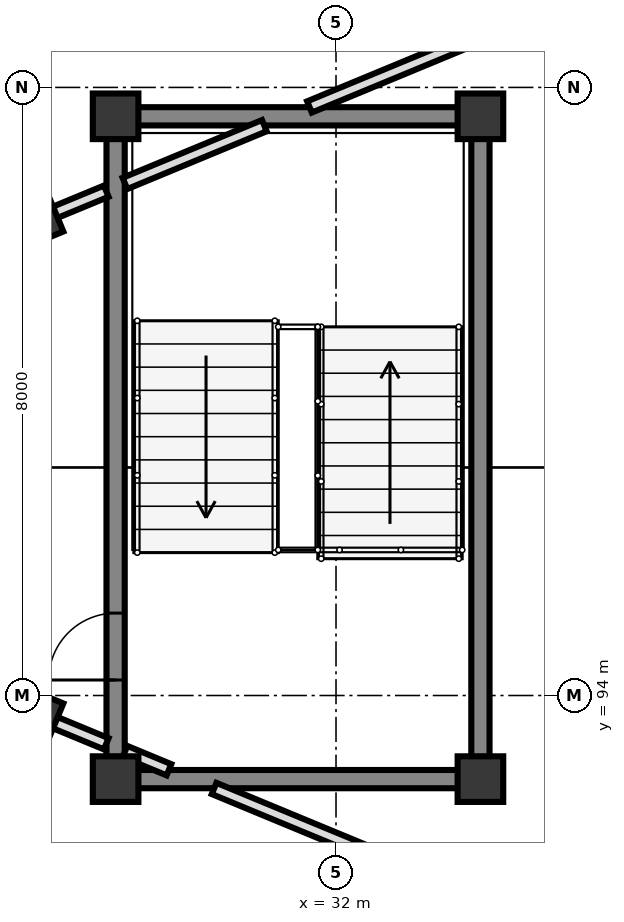
"""IFC4 building model, lengths in metres.
Left out: names, types, materials, properties, quantities, classifications, styles, units other than length and angle.
Written with IfcOpenShell. Run it as: python <this file> out.ifc"""

import sys

from ifc_helpers import new_model, si_unit, direction, frame, frame_2d, origin, origin_2d, place, context, subcontext, project, spatial, rectangle, extrude, element, fill, save


model = new_model("IFC4")
c1 = context("Model", 3, precision=1e-05, world=origin(), true_north=direction((0.0, 1.0)))
c2 = subcontext(c1, "Body", "Model", "MODEL_VIEW")
j1 = project(units=[si_unit("LENGTHUNIT", "METRE"), si_unit("PLANEANGLEUNIT", "RADIAN")], contexts=[c1])
p1 = place(None, origin())
s1 = spatial("IfcSite", under=j1, at=p1, CompositionType="ELEMENT")
p2 = place(p1, origin())
s2 = spatial("IfcBuilding", under=s1, at=p2, CompositionType="ELEMENT")
p3 = place(p2, frame((0.0, 0.0, 8.5)))
s3 = spatial("IfcBuildingStorey", under=s2, at=p3, CompositionType="ELEMENT", Elevation=8.5)
for number, where, z_axis, x_axis in (
    (1, (29.1, 92.9, 0.0), (0.0, 0.0, 1.0), (1.0, 0.0, 0.0)),
    (2, (33.9, 92.9, 0.0), (0.0, 0.0, 1.0), (1.0, 0.0, 0.0)),
    (3, (33.9, 101.62, 0.0), (0.0, 0.0, 1.0), (1.0, 0.0, 0.0)),
    (4, (29.1, 101.62, 0.0), (0.0, 0.0, 1.0), (1.0, 0.0, 0.0)),
):
    element("IfcColumn", number, at=place(p3, frame(where, z_axis=z_axis, x_axis=x_axis)), inside=s3, PredefinedType="COLUMN", context=c2, shape_type="SweptSolid", body=[
        extrude(rectangle(XDim=0.6, YDim=0.6, at=origin_2d()), origin(), (0.0, 0.0, 1.0), 4.0),
    ])
for number, where, z_axis, x_axis in (
    (5, (28.053, 100.253, 0.0), (0.0, 0.0, 1.0), (0.924, 0.383, 0.0)),
    (6, (28.053, 93.747, 0.0), (0.0, 0.0, 1.0), (0.924, -0.383, 0.0)),
):
    element("IfcColumn", number, at=place(p3, frame(where, z_axis=z_axis, x_axis=x_axis)), inside=s3, PredefinedType="COLUMN", context=c2, shape_type="SweptSolid", body=[
        extrude(rectangle(XDim=0.55, YDim=0.55, at=origin_2d()), origin(), (0.0, 0.0, 1.0), 4.0),
    ])
p4 = place(p3, frame((29.1, 93.192, 0.0), z_axis=(0.0, 0.0, 1.0), x_axis=(0.0, 1.0, 0.0)))
e7 = element("IfcWall", 7, at=p4, inside=s3, PredefinedType="SHEAR", context=c2, shape_type="SweptSolid", body=[
    extrude(rectangle(XDim=8.136, YDim=0.24, at=frame_2d((4.068, 0.0))), origin(), (0.0, 0.0, 1.0), 3.74),
])
p5 = place(p4, frame((1.012, 0.0, 0.0)))
e8 = element("IfcOpeningElement", 8, at=p5, cuts=e7, PredefinedType="OPENING", context=c2, shape_type="SweptSolid", body=[
    extrude(rectangle(XDim=0.88, YDim=2.1, at=frame_2d((0.44, 1.05))), frame((0.0, 0.13, 0.0), z_axis=(0.0, -1.0, 0.0), x_axis=(1.0, 0.0, 0.0)), (0.0, 0.0, 1.0), 0.26),
])
p6 = place(p3, frame((33.9, 101.328, 0.0), z_axis=(0.0, 0.0, 1.0), x_axis=(0.0, -1.0, 0.0)))
e9 = element("IfcWall", 9, at=p6, inside=s3, PredefinedType="SHEAR", context=c2, shape_type="SweptSolid", body=[
    extrude(rectangle(XDim=8.136, YDim=0.24, at=frame_2d((4.068, 0.0))), origin(), (0.0, 0.0, 1.0), 3.74),
])
for number, where, z_axis, x_axis in (
    (10, (33.608, 92.9, 0.0), (0.0, 0.0, 1.0), (-1.0, 0.0, 0.0)),
    (11, (33.608, 101.62, 0.0), (0.0, 0.0, 1.0), (-1.0, 0.0, 0.0)),
):
    element("IfcWall", number, at=place(p3, frame(where, z_axis=z_axis, x_axis=x_axis)), inside=s3, PredefinedType="SHEAR", context=c2, shape_type="SweptSolid", body=[
        extrude(rectangle(XDim=4.216, YDim=0.24, at=frame_2d((2.108, 0.0))), origin(), (0.0, 0.0, 1.0), 3.74),
    ])
p7 = place(p3, frame((28.3, 100.355, 0.0), z_axis=(0.0, 0.0, 1.0), x_axis=(0.924069600435, 0.382224245113, 0.0)))
e12 = element("IfcWall", 12, at=p7, inside=s3, PredefinedType="PARTITIONING", context=c2, shape_type="SweptSolid", body=[
    extrude(rectangle(XDim=0.733, YDim=0.16, at=frame_2d((0.366, 0.0))), origin(), (0.0, 0.0, 1.0), 3.7),
])
p8 = place(p3, frame((29.223, 100.737, 0.0), z_axis=(0.0, 0.0, 1.0), x_axis=(0.923817443679, 0.382833293686, 0.0)))
e13 = element("IfcWall", 13, at=p8, inside=s3, PredefinedType="PARTITIONING", context=c2, shape_type="SweptSolid", body=[
    extrude(rectangle(XDim=1.985, YDim=0.16, at=frame_2d((0.993, 0.0))), origin(), (0.0, 0.0, 1.0), 3.7),
])
p9 = place(p3, frame((31.651, 101.743, 0.0), z_axis=(0.0, 0.0, 1.0), x_axis=(0.923877739946, 0.382687759972, 0.0)))
e14 = element("IfcWall", 14, at=p9, inside=s3, PredefinedType="PARTITIONING", context=c2, shape_type="SweptSolid", body=[
    extrude(rectangle(XDim=4.813, YDim=0.16, at=frame_2d((2.407, 0.0))), origin(), (0.0, 0.0, 1.0), 3.7),
])
p10 = place(p3, frame((28.3, 93.645, 0.0), z_axis=(0.0, 0.0, 1.0), x_axis=(0.924069600435, -0.382224245113, 0.0)))
e15 = element("IfcWall", 15, at=p10, inside=s3, PredefinedType="PARTITIONING", context=c2, shape_type="SweptSolid", body=[
    extrude(rectangle(XDim=0.733, YDim=0.16, at=frame_2d((0.366, 0.0))), origin(), (0.0, 0.0, 1.0), 3.072),
])
p11 = place(p3, frame((29.223, 93.263, 0.0), z_axis=(0.0, 0.0, 1.0), x_axis=(0.923812676193, -0.382844797933, 0.0)))
e16 = element("IfcWall", 16, at=p11, inside=s3, PredefinedType="PARTITIONING", context=c2, shape_type="SweptSolid", body=[
    extrude(rectangle(XDim=0.627, YDim=0.16, at=frame_2d((0.313, 0.0))), origin(), (0.0, 0.0, 1.0), 3.072),
])
p12 = place(p3, frame((30.396, 92.777, 0.0), z_axis=(0.0, 0.0, 1.0), x_axis=(0.923864955254, -0.382718623082, 0.0)))
e17 = element("IfcWall", 17, at=p12, inside=s3, PredefinedType="PARTITIONING", context=c2, shape_type="SweptSolid", body=[
    extrude(rectangle(XDim=6.172, YDim=0.16, at=frame_2d((3.086, 0.0))), origin(), (0.0, 0.0, 1.0), 3.072),
])
p13 = place(p5, origin())
e18 = element("IfcDoor", 18, at=p13, inside=s3, OperationType="SINGLE_SWING_LEFT", PredefinedType="DOOR", context=c2, shape_type="SweptSolid", body=[
    extrude(rectangle(XDim=0.88, YDim=2.1, at=frame_2d((0.44, 1.05))), frame((0.0, 0.025, 0.0), z_axis=(0.0, -1.0, 0.0), x_axis=(1.0, 0.0, 0.0)), (0.0, 0.0, 1.0), 0.05),
])
fill(e8, e18)
save(model, sys.argv[1])
